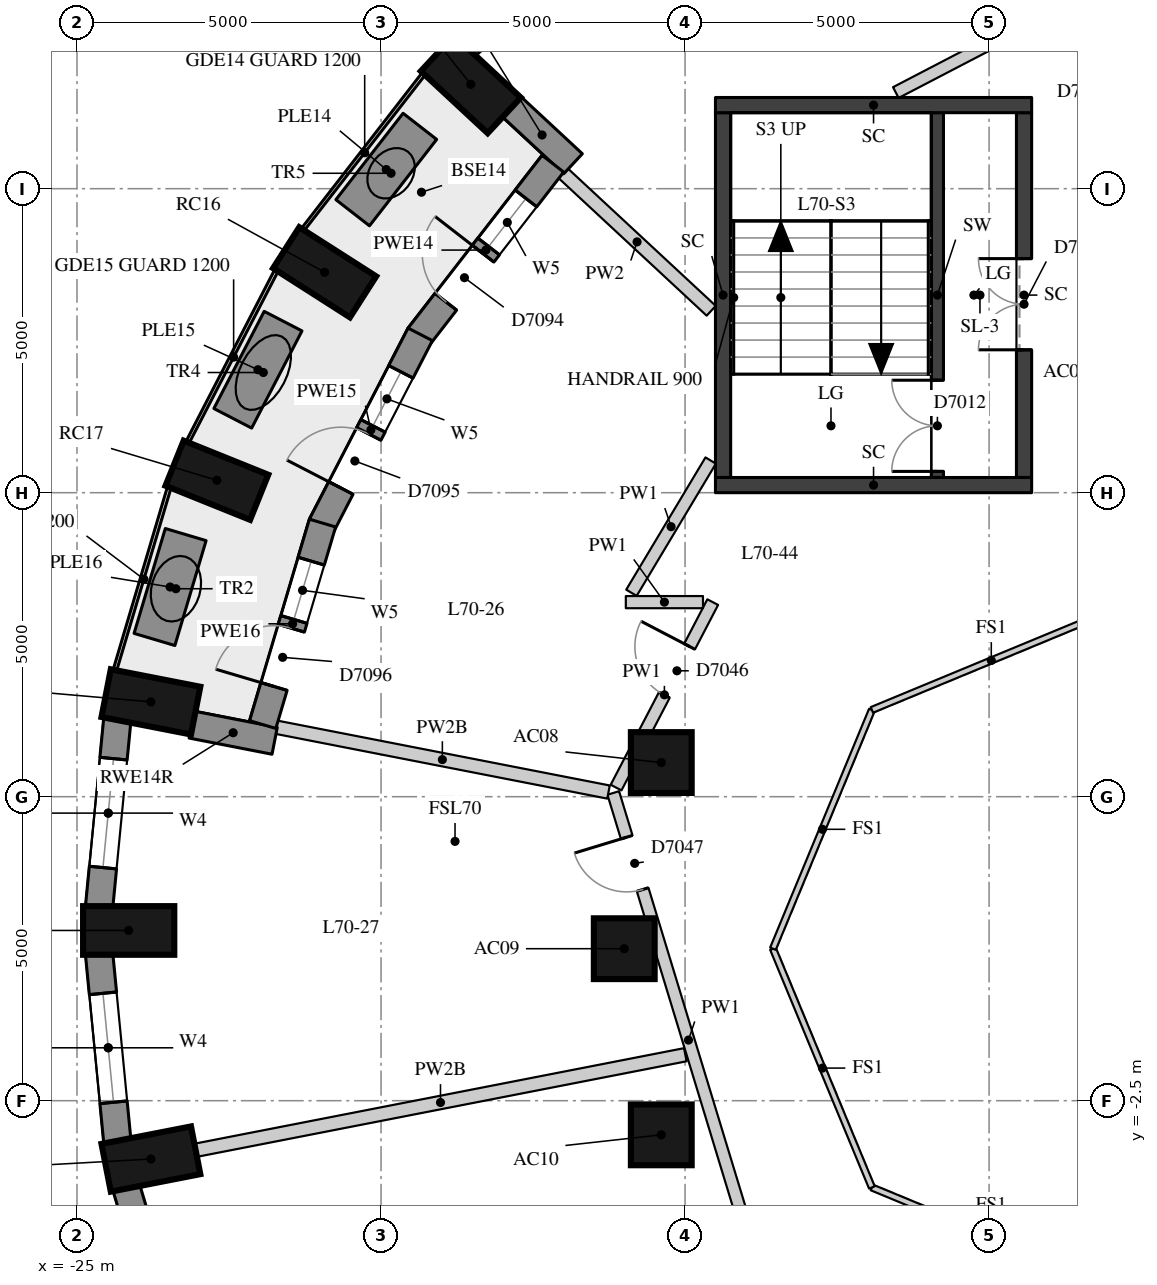
"""IFC4 building model, lengths in metres.
Left out: names, types, materials, properties, quantities, classifications, styles, units other than length and angle.
Written with IfcOpenShell. Run it as: python <this file> out.ifc"""

import sys

from ifc_helpers import new_model, si_unit, direction, frame, frame_2d, origin, origin_2d, place, context, subcontext, project, spatial, rectangle, extrude, element, fill, save


model = new_model("IFC4")
c1 = context("Model", 3, precision=1e-05, world=origin(), true_north=direction((0.0, 1.0)))
c2 = subcontext(c1, "Body", "Model", "MODEL_VIEW")
j1 = project(units=[si_unit("LENGTHUNIT", "METRE"), si_unit("PLANEANGLEUNIT", "RADIAN")], contexts=[c1])
p1 = place(None, origin())
s1 = spatial("IfcSite", under=j1, at=p1, CompositionType="ELEMENT")
p2 = place(p1, origin())
s2 = spatial("IfcBuilding", under=s1, at=p2, CompositionType="ELEMENT")
p3 = place(p2, frame((0.0, 0.0, 246.5)))
s3 = spatial("IfcBuildingStorey", under=s2, at=p3, CompositionType="ELEMENT", Elevation=246.5)
for number, where, z_axis, x_axis in (
    (1, (-18.523, 14.216, 0.0), (0.0, 0.0, 1.0), (-0.733, 0.681, 0.0)),
    (2, (-20.928, 11.125, 0.0), (0.0, 0.0, 1.0), (-0.843, 0.539, 0.0)),
    (3, (-22.7, 7.705, 0.0), (0.0, 0.0, 1.0), (-0.928, 0.374, 0.0)),
    (4, (-23.785, 4.06, 0.0), (0.0, 0.0, 1.0), (-0.981, 0.192, 0.0)),
    (5, (-24.15, 0.3, 0.0), (0.0, 0.0, 1.0), (-1.0, 0.0, 0.0)),
    (6, (-23.785, -3.459, 0.0), (0.0, 0.0, 1.0), (-0.981, -0.192, 0.0)),
):
    element("IfcColumn", number, at=place(p3, frame(where, z_axis=z_axis, x_axis=x_axis)), inside=s3, PredefinedType="COLUMN", context=c2, shape_type="SweptSolid", body=[
        extrude(rectangle(XDim=1.5, YDim=0.8, at=origin_2d()), origin(), (0.0, 0.0, 1.0), 3.3),
    ])
for number, where, z_axis, x_axis in (
    (7, (-15.391, 3.062, 0.0), (0.0, 0.0, 1.0), (1.0, 0.0, 0.0)),
    (8, (-16.0, 0.0, 0.0), (0.0, 0.0, 1.0), (1.0, 0.0, 0.0)),
    (9, (-15.391, -3.062, 0.0), (0.0, 0.0, 1.0), (1.0, 0.0, 0.0)),
):
    element("IfcColumn", number, at=place(p3, frame(where, z_axis=z_axis, x_axis=x_axis)), inside=s3, PredefinedType="COLUMN", context=c2, shape_type="SweptSolid", body=[
        extrude(rectangle(XDim=1.0, YDim=1.0, at=origin_2d()), origin(), (0.0, 0.0, 1.0), 3.3),
    ])
p4 = place(p3, frame((-16.159, 17.047, 0.0), z_axis=(0.0, 0.0, 1.0), x_axis=(-0.743166014219, -0.669107073128, 0.0)))
e10 = element("IfcWall", 10, at=p4, inside=s3, PredefinedType="SOLIDWALL", context=c2, shape_type="SweptSolid", body=[
    extrude(rectangle(XDim=3.316, YDim=0.45, at=frame_2d((1.658, 0.0))), origin(), (0.0, 0.0, 1.0), 3.02),
])
p5 = place(p4, frame((0.758, 0.0, 0.4)))
e11 = element("IfcOpeningElement", 11, at=p5, cuts=e10, PredefinedType="OPENING", context=c2, shape_type="SweptSolid", body=[
    extrude(rectangle(XDim=1.8, YDim=1.75, at=frame_2d((0.9, 0.875))), frame((0.0, 0.235, 0.0), z_axis=(0.0, -1.0, 0.0), x_axis=(1.0, 0.0, 0.0)), (0.0, 0.0, 1.0), 0.47),
])
p6 = place(p3, frame((-24.336, 3.78, 0.0), z_axis=(0.0, 0.0, 1.0), x_axis=(-0.096740086873, -0.995309678237, 0.0)))
e12 = element("IfcWall", 12, at=p6, inside=s3, PredefinedType="SOLIDWALL", context=c2, shape_type="SweptSolid", body=[
    extrude(rectangle(XDim=3.114, YDim=0.45, at=frame_2d((1.557, 0.0))), origin(), (0.0, 0.0, 1.0), 3.02),
])
p7 = place(p6, frame((0.657, 0.0, 0.4)))
e13 = element("IfcOpeningElement", 13, at=p7, cuts=e12, PredefinedType="OPENING", context=c2, shape_type="SweptSolid", body=[
    extrude(rectangle(XDim=1.8, YDim=1.75, at=frame_2d((0.9, 0.875))), frame((0.0, 0.235, 0.0), z_axis=(0.0, -1.0, 0.0), x_axis=(1.0, 0.0, 0.0)), (0.0, 0.0, 1.0), 0.47),
])
p8 = place(p3, frame((-24.637, -0.08, 0.0), z_axis=(0.0, 0.0, 1.0), x_axis=(0.09673253904, -0.995310411827, 0.0)))
e14 = element("IfcWall", 14, at=p8, inside=s3, PredefinedType="SOLIDWALL", context=c2, shape_type="SweptSolid", body=[
    extrude(rectangle(XDim=3.115, YDim=0.45, at=frame_2d((1.557, 0.0))), origin(), (0.0, 0.0, 1.0), 3.02),
])
p9 = place(p8, frame((0.657, 0.0, 0.4)))
e15 = element("IfcOpeningElement", 15, at=p9, cuts=e14, PredefinedType="OPENING", context=c2, shape_type="SweptSolid", body=[
    extrude(rectangle(XDim=1.8, YDim=1.75, at=frame_2d((0.9, 0.875))), frame((0.0, 0.235, 0.0), z_axis=(0.0, -1.0, 0.0), x_axis=(1.0, 0.0, 0.0)), (0.0, 0.0, 1.0), 0.47),
])
p10 = place(p3, frame((-24.19, -3.926, 0.0), z_axis=(0.0, 0.0, 1.0), x_axis=(0.285263800865, -0.958449040855, 0.0)))
e16 = element("IfcWall", 16, at=p10, inside=s3, PredefinedType="SOLIDWALL", context=c2, shape_type="SweptSolid", body=[
    extrude(rectangle(XDim=3.139, YDim=0.45, at=frame_2d((1.57, 0.0))), origin(), (0.0, 0.0, 1.0), 3.02),
])
p11 = place(p10, frame((0.67, 0.0, 0.4)))
e17 = element("IfcOpeningElement", 17, at=p11, cuts=e16, PredefinedType="OPENING", context=c2, shape_type="SweptSolid", body=[
    extrude(rectangle(XDim=1.8, YDim=1.75, at=frame_2d((0.9, 0.875))), frame((0.0, 0.235, 0.0), z_axis=(0.0, -1.0, 0.0), x_axis=(1.0, 0.0, 0.0)), (0.0, 0.0, 1.0), 0.47),
])
p12 = place(p3, frame((-17.861, 13.857, 0.0), z_axis=(0.0, 0.0, 1.0), x_axis=(0.732605925603, -0.680653037731, 0.0)))
e18 = element("IfcWall", 18, at=p12, inside=s3, PredefinedType="SOLIDWALL", context=c2, shape_type="SweptSolid", body=[
    extrude(rectangle(XDim=1.391, YDim=0.45, at=frame_2d((0.695, 0.0))), origin(), (0.0, 0.0, 1.0), 3.02),
])
p13 = place(p3, frame((-23.114, 3.685, 0.0), z_axis=(0.0, 0.0, 1.0), x_axis=(0.981468844755, -0.191621780535, 0.0)))
e19 = element("IfcWall", 19, at=p13, inside=s3, PredefinedType="SOLIDWALL", context=c2, shape_type="SweptSolid", body=[
    extrude(rectangle(XDim=1.39, YDim=0.45, at=frame_2d((0.695, 0.0))), origin(), (0.0, 0.0, 1.0), 2.57),
])
p14 = place(p3, frame((-17.174, 12.911, 0.0), z_axis=(0.0, 0.0, 1.0), x_axis=(-0.612774197557, -0.79025804824, 0.0)))
e20 = element("IfcWall", 20, at=p14, inside=s3, PredefinedType="SOLIDWALL", context=c2, shape_type="SweptSolid", body=[
    extrude(rectangle(XDim=3.596, YDim=0.45, at=frame_2d((1.798, 0.0))), origin(), (0.0, 0.0, 1.0), 3.02),
])
p15 = place(p14, frame((0.723, 0.0, 0.4)))
e21 = element("IfcOpeningElement", 21, at=p15, cuts=e20, PredefinedType="OPENING", context=c2, shape_type="SweptSolid", body=[
    extrude(rectangle(XDim=1.0, YDim=1.75, at=frame_2d((0.5, 0.875))), frame((0.0, 0.235, 0.0), z_axis=(0.0, -1.0, 0.0), x_axis=(1.0, 0.0, 0.0)), (0.0, 0.0, 1.0), 0.47),
])
p16 = place(p14, frame((1.873, 0.0, 0.0)))
e22 = element("IfcOpeningElement", 22, at=p16, cuts=e20, PredefinedType="OPENING", context=c2, shape_type="SweptSolid", body=[
    extrude(rectangle(XDim=1.0, YDim=2.15, at=frame_2d((0.5, 1.075))), frame((0.0, 0.235, 0.0), z_axis=(0.0, -1.0, 0.0), x_axis=(1.0, 0.0, 0.0)), (0.0, 0.0, 1.0), 0.47),
])
p17 = place(p3, frame((-19.355, 10.104, 0.0), z_axis=(0.0, 0.0, 1.0), x_axis=(-0.458852093952, -0.888512665006, 0.0)))
e23 = element("IfcWall", 23, at=p17, inside=s3, PredefinedType="SOLIDWALL", context=c2, shape_type="SweptSolid", body=[
    extrude(rectangle(XDim=3.538, YDim=0.45, at=frame_2d((1.769, 0.0))), origin(), (0.0, 0.0, 1.0), 3.02),
])
p18 = place(p17, frame((0.694, 0.0, 0.4)))
e24 = element("IfcOpeningElement", 24, at=p18, cuts=e23, PredefinedType="OPENING", context=c2, shape_type="SweptSolid", body=[
    extrude(rectangle(XDim=1.0, YDim=1.75, at=frame_2d((0.5, 0.875))), frame((0.0, 0.235, 0.0), z_axis=(0.0, -1.0, 0.0), x_axis=(1.0, 0.0, 0.0)), (0.0, 0.0, 1.0), 0.47),
])
p19 = place(p17, frame((1.844, 0.0, 0.0)))
e25 = element("IfcOpeningElement", 25, at=p19, cuts=e23, PredefinedType="OPENING", context=c2, shape_type="SweptSolid", body=[
    extrude(rectangle(XDim=1.0, YDim=2.15, at=frame_2d((0.5, 1.075))), frame((0.0, 0.235, 0.0), z_axis=(0.0, -1.0, 0.0), x_axis=(1.0, 0.0, 0.0)), (0.0, 0.0, 1.0), 0.47),
])
p20 = place(p3, frame((-20.963, 7.0, 0.0), z_axis=(0.0, 0.0, 1.0), x_axis=(-0.284437019833, -0.958694728132, 0.0)))
e26 = element("IfcWall", 26, at=p20, inside=s3, PredefinedType="SOLIDWALL", context=c2, shape_type="SweptSolid", body=[
    extrude(rectangle(XDim=3.457, YDim=0.45, at=frame_2d((1.728, 0.0))), origin(), (0.0, 0.0, 1.0), 3.02),
])
p21 = place(p20, frame((0.653, 0.0, 0.4)))
e27 = element("IfcOpeningElement", 27, at=p21, cuts=e26, PredefinedType="OPENING", context=c2, shape_type="SweptSolid", body=[
    extrude(rectangle(XDim=1.0, YDim=1.75, at=frame_2d((0.5, 0.875))), frame((0.0, 0.235, 0.0), z_axis=(0.0, -1.0, 0.0), x_axis=(1.0, 0.0, 0.0)), (0.0, 0.0, 1.0), 0.47),
])
p22 = place(p20, frame((1.803, 0.0, 0.0)))
e28 = element("IfcOpeningElement", 28, at=p22, cuts=e26, PredefinedType="OPENING", context=c2, shape_type="SweptSolid", body=[
    extrude(rectangle(XDim=1.0, YDim=2.15, at=frame_2d((0.5, 1.075))), frame((0.0, 0.235, 0.0), z_axis=(0.0, -1.0, 0.0), x_axis=(1.0, 0.0, 0.0)), (0.0, 0.0, 1.0), 0.47),
])
for number, where, z_axis, x_axis in (
    (29, (-19.361, 13.525, 0.0), (0.0, 0.0, 1.0), (-0.614, -0.789, 0.0)),
    (30, (-21.611, 10.322, 0.0), (0.0, 0.0, 1.0), (-0.46, -0.888, 0.0)),
):
    element("IfcWall", number, at=place(p3, frame(where, z_axis=z_axis, x_axis=x_axis)), inside=s3, PredefinedType="USERDEFINED", context=c2, shape_type="SweptSolid", body=[
        extrude(rectangle(XDim=1.8, YDim=0.7, at=frame_2d((0.9, 0.0))), origin(), (0.0, 0.0, 1.0), 0.75),
    ])
p23 = place(p3, frame((-23.212, 6.811, 0.0), z_axis=(0.0, 0.0, 1.0), x_axis=(-0.28525656157, -0.958451195461, 0.0)))
e31 = element("IfcWall", 31, at=p23, inside=s3, PredefinedType="USERDEFINED", context=c2, shape_type="SweptSolid", body=[
    extrude(rectangle(XDim=1.8, YDim=0.7, at=frame_2d((0.9, 0.0))), origin(), (0.0, 0.0, 1.0), 0.75),
])
p24 = place(p3, frame((-10.85, 7.75, 0.0), z_axis=(0.0, 0.0, 1.0), x_axis=(0.0, 1.0, 0.0)))
e32 = element("IfcWall", 32, at=p24, inside=s3, PredefinedType="SHEAR", context=c2, shape_type="SweptSolid", body=[
    extrude(rectangle(XDim=6.0, YDim=0.2, at=frame_2d((3.0, 0.0))), origin(), (0.0, 0.0, 1.0), 3.02),
])
p25 = place(p24, frame((0.1, 0.0, 0.0)))
e33 = element("IfcOpeningElement", 33, at=p25, cuts=e32, PredefinedType="OPENING", context=c2, shape_type="SweptSolid", body=[
    extrude(rectangle(XDim=1.5, YDim=2.1, at=frame_2d((0.75, 1.05))), frame((0.0, 0.11, 0.0), z_axis=(0.0, -1.0, 0.0), x_axis=(1.0, 0.0, 0.0)), (0.0, 0.0, 1.0), 0.22),
])
p26 = place(p3, frame((-14.375, 7.75, -0.28), z_axis=(0.0, 0.0, 1.0), x_axis=(0.0, 1.0, 0.0)))
e34 = element("IfcWall", 34, at=p26, inside=s3, PredefinedType="SHEAR", context=c2, shape_type="SweptSolid", body=[
    extrude(rectangle(XDim=6.0, YDim=0.25, at=frame_2d((3.0, 0.0))), origin(), (0.0, 0.0, 1.0), 3.3),
])
p27 = place(p3, frame((-9.425, 7.75, -0.28), z_axis=(0.0, 0.0, 1.0), x_axis=(0.0, 1.0, 0.0)))
e35 = element("IfcWall", 35, at=p27, inside=s3, PredefinedType="SHEAR", context=c2, shape_type="SweptSolid", body=[
    extrude(rectangle(XDim=6.0, YDim=0.25, at=frame_2d((3.0, 0.0))), origin(), (0.0, 0.0, 1.0), 3.3),
])
p28 = place(p27, frame((2.1, 0.0, 0.28)))
e36 = element("IfcOpeningElement", 36, at=p28, cuts=e35, PredefinedType="OPENING", context=c2, shape_type="SweptSolid", body=[
    extrude(rectangle(XDim=1.5, YDim=2.1, at=frame_2d((0.75, 1.05))), frame((0.0, 0.135, 0.0), z_axis=(0.0, -1.0, 0.0), x_axis=(1.0, 0.0, 0.0)), (0.0, 0.0, 1.0), 0.27),
])
for number, where, z_axis, x_axis in (
    (37, (-14.5, 13.875, -0.28), (0.0, 0.0, 1.0), (1.0, 0.0, 0.0)),
    (38, (-14.5, 7.625, -0.28), (0.0, 0.0, 1.0), (1.0, 0.0, 0.0)),
):
    element("IfcWall", number, at=place(p3, frame(where, z_axis=z_axis, x_axis=x_axis)), inside=s3, PredefinedType="SHEAR", context=c2, shape_type="SweptSolid", body=[
        extrude(rectangle(XDim=5.2, YDim=0.25, at=frame_2d((2.6, 0.0))), origin(), (0.0, 0.0, 1.0), 3.3),
    ])
p29 = place(p3, frame((-13.707, -5.567, 0.0), z_axis=(0.0, 0.0, 1.0), x_axis=(-0.29116047228, 0.956674228451, 0.0)))
e39 = element("IfcWall", 39, at=p29, inside=s3, PredefinedType="PARTITIONING", context=c2, shape_type="SweptSolid", body=[
    extrude(rectangle(XDim=8.496, YDim=0.2, at=frame_2d((4.248, 0.0))), origin(), (0.0, 0.0, 1.0), 3.02),
])
p30 = place(p29, frame((6.836, 0.0, 0.0)))
e40 = element("IfcOpeningElement", 40, at=p30, cuts=e39, PredefinedType="OPENING", context=c2, shape_type="SweptSolid", body=[
    extrude(rectangle(XDim=0.9, YDim=2.1, at=frame_2d((0.45, 1.05))), frame((0.0, 0.11, 0.0), z_axis=(0.0, -1.0, 0.0), x_axis=(1.0, 0.0, 0.0)), (0.0, 0.0, 1.0), 0.22),
])
p31 = place(p3, frame((-16.134, 2.65, 0.0), z_axis=(0.0, 0.0, 1.0), x_axis=(0.462143812638, 0.886804993468, 0.0)))
e41 = element("IfcWall", 41, at=p31, inside=s3, PredefinedType="PARTITIONING", context=c2, shape_type="SweptSolid", body=[
    extrude(rectangle(XDim=3.439, YDim=0.2, at=frame_2d((1.72, 0.0))), origin(), (0.0, 0.0, 1.0), 3.02),
])
p32 = place(p31, frame((1.716, 0.0, 0.0)))
e42 = element("IfcOpeningElement", 42, at=p32, cuts=e41, PredefinedType="OPENING", context=c2, shape_type="SweptSolid", body=[
    extrude(rectangle(XDim=0.9, YDim=2.1, at=frame_2d((0.45, 1.05))), frame((0.0, 0.11, 0.0), z_axis=(0.0, -1.0, 0.0), x_axis=(1.0, 0.0, 0.0)), (0.0, 0.0, 1.0), 0.22),
])
p33 = place(p3, frame((-14.705, 5.7, 0.0), z_axis=(0.0, 0.0, 1.0), x_axis=(-1.0, 0.0, 0.0)))
e43 = element("IfcWall", 43, at=p33, inside=s3, PredefinedType="PARTITIONING", context=c2, shape_type="SweptSolid", body=[
    extrude(rectangle(XDim=1.269, YDim=0.2, at=frame_2d((0.635, 0.0))), origin(), (0.0, 0.0, 1.0), 3.02),
])
p34 = place(p3, frame((-15.882, 5.854, 0.0), z_axis=(0.0, 0.0, 1.0), x_axis=(0.514042598012, 0.857764657368, 0.0)))
e44 = element("IfcWall", 44, at=p34, inside=s3, PredefinedType="PARTITIONING", context=c2, shape_type="SweptSolid", body=[
    extrude(rectangle(XDim=2.536, YDim=0.2, at=frame_2d((1.268, 0.0))), origin(), (0.0, 0.0, 1.0), 3.02),
])
p35 = place(p3, frame((-11.534, 14.081, 0.0), z_axis=(0.0, 0.0, 1.0), x_axis=(0.886975089277, 0.461817270143, 0.0)))
e45 = element("IfcWall", 45, at=p35, inside=s3, PredefinedType="PARTITIONING", context=c2, shape_type="SweptSolid", body=[
    extrude(rectangle(XDim=3.723, YDim=0.2, at=frame_2d((1.861, 0.0))), origin(), (0.0, 0.0, 1.0), 3.02),
])
p36 = place(p3, frame((-17.009, 12.758, 0.0), z_axis=(0.0, 0.0, 1.0), x_axis=(0.732631495403, -0.680625515202, 0.0)))
e46 = element("IfcWall", 46, at=p36, inside=s3, PredefinedType="PARTITIONING", context=c2, shape_type="SweptSolid", body=[
    extrude(rectangle(XDim=3.328, YDim=0.22, at=frame_2d((1.664, 0.0))), origin(), (0.0, 0.0, 1.0), 3.02),
])
p37 = place(p3, frame((-21.724, 3.643, 0.0), z_axis=(0.0, 0.0, 1.0), x_axis=(0.981482350032, -0.191552594804, 0.0)))
e47 = element("IfcWall", 47, at=p37, inside=s3, PredefinedType="PARTITIONING", context=c2, shape_type="SweptSolid", body=[
    extrude(rectangle(XDim=5.568, YDim=0.22, at=frame_2d((2.784, 0.0))), origin(), (0.0, 0.0, 1.0), 2.57),
])
p38 = place(p3, frame((-23.049, -3.316, 0.0), z_axis=(0.0, 0.0, 1.0), x_axis=(0.981479950205, 0.19156489069, 0.0)))
e48 = element("IfcWall", 48, at=p38, inside=s3, PredefinedType="PARTITIONING", context=c2, shape_type="SweptSolid", body=[
    extrude(rectangle(XDim=8.205, YDim=0.22, at=frame_2d((4.103, 0.0))), origin(), (0.0, 0.0, 1.0), 2.57),
])
for number, where, z_axis, x_axis in (
    (49, (-8.0, -5.554, 0.0), (0.0, 0.0, 1.0), (-0.924, 0.383, 0.0)),
    (50, (-11.927, -3.927, 0.0), (0.0, 0.0, 1.0), (-0.383, 0.924, 0.0)),
    (51, (-13.554, 0.0, 0.0), (0.0, 0.0, 1.0), (0.383, 0.924, 0.0)),
    (52, (-11.927, 3.927, 0.0), (0.0, 0.0, 1.0), (0.924, 0.383, 0.0)),
):
    element("IfcWall", number, at=place(p3, frame(where, z_axis=z_axis, x_axis=x_axis)), inside=s3, PredefinedType="PARTITIONING", context=c2, shape_type="SweptSolid", body=[
        extrude(rectangle(XDim=4.251, YDim=0.1, at=frame_2d((2.125, 0.0))), origin(), (0.0, 0.0, 1.0), 3.02),
    ])
p39 = place(p7, origin())
e53 = element("IfcWindow", 53, at=p39, inside=s3, PartitioningType="SINGLE_PANEL", PredefinedType="WINDOW", context=c2, shape_type="SweptSolid", body=[
    extrude(rectangle(XDim=1.8, YDim=1.75, at=frame_2d((0.9, 0.875))), frame((0.0, 0.035, 0.0), z_axis=(0.0, -1.0, 0.0), x_axis=(1.0, 0.0, 0.0)), (0.0, 0.0, 1.0), 0.06),
])
fill(e13, e53)
p40 = place(p9, origin())
e54 = element("IfcWindow", 54, at=p40, inside=s3, PartitioningType="SINGLE_PANEL", PredefinedType="WINDOW", context=c2, shape_type="SweptSolid", body=[
    extrude(rectangle(XDim=1.8, YDim=1.75, at=frame_2d((0.9, 0.875))), frame((0.0, 0.035, 0.0), z_axis=(0.0, -1.0, 0.0), x_axis=(1.0, 0.0, 0.0)), (0.0, 0.0, 1.0), 0.06),
])
fill(e15, e54)
p41 = place(p15, origin())
e55 = element("IfcWindow", 55, at=p41, inside=s3, PartitioningType="SINGLE_PANEL", PredefinedType="WINDOW", context=c2, shape_type="SweptSolid", body=[
    extrude(rectangle(XDim=1.0, YDim=1.75, at=frame_2d((0.5, 0.875))), frame((0.0, 0.035, 0.0), z_axis=(0.0, -1.0, 0.0), x_axis=(1.0, 0.0, 0.0)), (0.0, 0.0, 1.0), 0.06),
])
fill(e21, e55)
p42 = place(p16, frame((1.0, 0.0, 0.0), z_axis=(0.0, 0.0, 1.0), x_axis=(-1.0, 0.0, 0.0)))
e56 = element("IfcDoor", 56, at=p42, inside=s3, OperationType="SINGLE_SWING_RIGHT", PredefinedType="DOOR", context=c2, shape_type="SweptSolid", body=[
    extrude(rectangle(XDim=1.0, YDim=2.15, at=frame_2d((0.5, 1.075))), frame((0.0, 0.075, 0.0), z_axis=(0.0, -1.0, 0.0), x_axis=(1.0, 0.0, 0.0)), (0.0, 0.0, 1.0), 0.05),
])
fill(e22, e56)
p43 = place(p18, origin())
e57 = element("IfcWindow", 57, at=p43, inside=s3, PartitioningType="SINGLE_PANEL", PredefinedType="WINDOW", context=c2, shape_type="SweptSolid", body=[
    extrude(rectangle(XDim=1.0, YDim=1.75, at=frame_2d((0.5, 0.875))), frame((0.0, 0.035, 0.0), z_axis=(0.0, -1.0, 0.0), x_axis=(1.0, 0.0, 0.0)), (0.0, 0.0, 1.0), 0.06),
])
fill(e24, e57)
p44 = place(p19, frame((1.0, 0.0, 0.0), z_axis=(0.0, 0.0, 1.0), x_axis=(-1.0, 0.0, 0.0)))
e58 = element("IfcDoor", 58, at=p44, inside=s3, OperationType="SINGLE_SWING_LEFT", PredefinedType="DOOR", context=c2, shape_type="SweptSolid", body=[
    extrude(rectangle(XDim=1.0, YDim=2.15, at=frame_2d((0.5, 1.075))), frame((0.0, 0.075, 0.0), z_axis=(0.0, -1.0, 0.0), x_axis=(1.0, 0.0, 0.0)), (0.0, 0.0, 1.0), 0.05),
])
fill(e25, e58)
p45 = place(p21, origin())
e59 = element("IfcWindow", 59, at=p45, inside=s3, PartitioningType="SINGLE_PANEL", PredefinedType="WINDOW", context=c2, shape_type="SweptSolid", body=[
    extrude(rectangle(XDim=1.0, YDim=1.75, at=frame_2d((0.5, 0.875))), frame((0.0, 0.035, 0.0), z_axis=(0.0, -1.0, 0.0), x_axis=(1.0, 0.0, 0.0)), (0.0, 0.0, 1.0), 0.06),
])
fill(e27, e59)
p46 = place(p22, frame((1.0, 0.0, 0.0), z_axis=(0.0, 0.0, 1.0), x_axis=(-1.0, 0.0, 0.0)))
e60 = element("IfcDoor", 60, at=p46, inside=s3, OperationType="SINGLE_SWING_LEFT", PredefinedType="DOOR", context=c2, shape_type="SweptSolid", body=[
    extrude(rectangle(XDim=1.0, YDim=2.15, at=frame_2d((0.5, 1.075))), frame((0.0, 0.075, 0.0), z_axis=(0.0, -1.0, 0.0), x_axis=(1.0, 0.0, 0.0)), (0.0, 0.0, 1.0), 0.05),
])
fill(e28, e60)
p47 = place(p25, origin())
e61 = element("IfcDoor", 61, at=p47, inside=s3, OperationType="DOUBLE_DOOR_SINGLE_SWING", PredefinedType="DOOR", context=c2, shape_type="SweptSolid", body=[
    extrude(rectangle(XDim=1.5, YDim=2.1, at=frame_2d((0.75, 1.05))), frame((0.0, 0.025, 0.0), z_axis=(0.0, -1.0, 0.0), x_axis=(1.0, 0.0, 0.0)), (0.0, 0.0, 1.0), 0.05),
])
fill(e33, e61)
p48 = place(p28, origin())
e62 = element("IfcDoor", 62, at=p48, inside=s3, OperationType="DOUBLE_DOOR_SINGLE_SWING", PredefinedType="DOOR", context=c2, shape_type="SweptSolid", body=[
    extrude(rectangle(XDim=1.5, YDim=2.1, at=frame_2d((0.75, 1.05))), frame((0.0, 0.025, 0.0), z_axis=(0.0, -1.0, 0.0), x_axis=(1.0, 0.0, 0.0)), (0.0, 0.0, 1.0), 0.05),
])
fill(e36, e62)
p49 = place(p32, origin())
e63 = element("IfcDoor", 63, at=p49, inside=s3, OperationType="SINGLE_SWING_RIGHT", PredefinedType="DOOR", context=c2, shape_type="SweptSolid", body=[
    extrude(rectangle(XDim=0.9, YDim=2.1, at=frame_2d((0.45, 1.05))), frame((0.0, 0.025, 0.0), z_axis=(0.0, -1.0, 0.0), x_axis=(1.0, 0.0, 0.0)), (0.0, 0.0, 1.0), 0.05),
])
fill(e42, e63)
p50 = place(p30, origin())
e64 = element("IfcDoor", 64, at=p50, inside=s3, OperationType="SINGLE_SWING_RIGHT", PredefinedType="DOOR", context=c2, shape_type="SweptSolid", body=[
    extrude(rectangle(XDim=0.9, YDim=2.1, at=frame_2d((0.45, 1.05))), frame((0.0, 0.025, 0.0), z_axis=(0.0, -1.0, 0.0), x_axis=(1.0, 0.0, 0.0)), (0.0, 0.0, 1.0), 0.05),
])
fill(e40, e64)
save(model, sys.argv[1])
